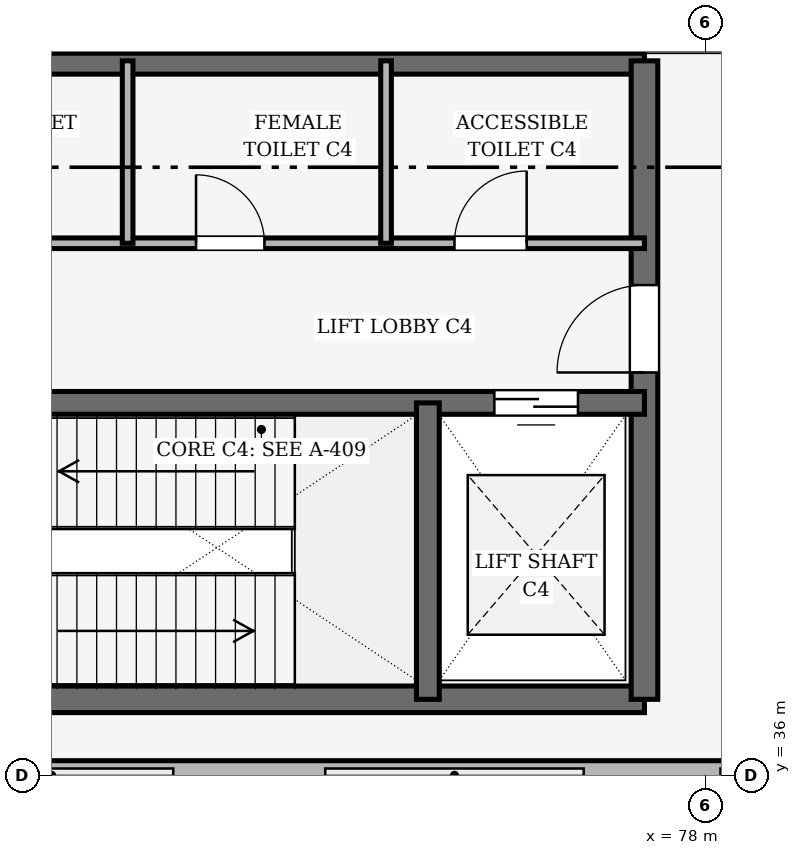
"""IFC4 building model, lengths in metres.
Left out: names, types, materials, properties, quantities, classifications, styles, units other than length and angle.
Written with IfcOpenShell. Run it as: python <this file> out.ifc"""

import sys

from ifc_helpers import new_model, si_unit, direction, frame, frame_2d, origin, place, context, subcontext, project, spatial, rectangle, extrude, element, fill, save


model = new_model("IFC4")
c1 = context("Model", 3, precision=1e-05, world=origin(), true_north=direction((0.0, 1.0)))
c2 = subcontext(c1, "Body", "Model", "MODEL_VIEW")
j1 = project(units=[si_unit("LENGTHUNIT", "METRE"), si_unit("PLANEANGLEUNIT", "RADIAN")], contexts=[c1])
p1 = place(None, origin())
s1 = spatial("IfcSite", under=j1, at=p1, CompositionType="ELEMENT")
p2 = place(p1, origin())
s2 = spatial("IfcBuilding", under=s1, at=p2, CompositionType="ELEMENT")
p3 = place(p2, frame((0.0, 0.0, 5.4)))
s3 = spatial("IfcBuildingStorey", under=s2, at=p3, CompositionType="ELEMENT", Elevation=5.4)
p4 = place(p3, frame((66.0, 36.0, 0.0), z_axis=(0.0, 0.0, 1.0), x_axis=(1.0, 0.0, 0.0)))
e1 = element("IfcWall", 1, at=p4, inside=s3, PredefinedType="SOLIDWALL", context=c2, shape_type="SweptSolid", body=[
    extrude(rectangle(XDim=18.0, YDim=0.385, at=frame_2d((9.0, 0.0))), origin(), (0.0, 0.0, 1.0), 0.6),
])
for number, where, z_axis, x_axis in (
    (2, (67.0, 37.0, 0.0), (0.0, 0.0, 1.0), (1.0, 0.0, 0.0)),
    (3, (77.2, 45.4, 0.0), (0.0, 0.0, 1.0), (-1.0, 0.0, 0.0)),
):
    element("IfcWall", number, at=place(p3, frame(where, z_axis=z_axis, x_axis=x_axis)), inside=s3, PredefinedType="SHEAR", context=c2, shape_type="SweptSolid", body=[
        extrude(rectangle(XDim=10.2, YDim=0.35, at=frame_2d((5.1, 0.0))), origin(), (0.0, 0.0, 1.0), 5.4),
    ])
p5 = place(p3, frame((77.2, 37.0, 0.0), z_axis=(0.0, 0.0, 1.0), x_axis=(0.0, 1.0, 0.0)))
e4 = element("IfcWall", 4, at=p5, inside=s3, PredefinedType="SHEAR", context=c2, shape_type="SweptSolid", body=[
    extrude(rectangle(XDim=8.4, YDim=0.35, at=frame_2d((4.2, 0.0))), origin(), (0.0, 0.0, 1.0), 5.4),
])
p6 = place(p5, frame((4.3, 0.0, 0.0)))
e5 = element("IfcOpeningElement", 5, at=p6, cuts=e4, PredefinedType="OPENING", context=c2, shape_type="SweptSolid", body=[
    extrude(rectangle(XDim=1.15, YDim=2.15, at=frame_2d((0.575, 1.075))), frame((0.0, 0.185, 0.0), z_axis=(0.0, -1.0, 0.0), x_axis=(1.0, 0.0, 0.0)), (0.0, 0.0, 1.0), 0.37),
])
p7 = place(p3, frame((67.0, 40.9, 0.0), z_axis=(0.0, 0.0, 1.0), x_axis=(1.0, 0.0, 0.0)))
e6 = element("IfcWall", 6, at=p7, inside=s3, PredefinedType="SHEAR", context=c2, shape_type="SweptSolid", body=[
    extrude(rectangle(XDim=10.2, YDim=0.3, at=frame_2d((5.1, 0.0))), origin(), (0.0, 0.0, 1.0), 5.4),
])
p8 = place(p7, frame((0.28, 0.0, 0.0)))
e7 = element("IfcOpeningElement", 7, at=p8, cuts=e6, PredefinedType="OPENING", context=c2, shape_type="SweptSolid", body=[
    extrude(rectangle(XDim=1.45, YDim=2.15, at=frame_2d((0.725, 1.075))), frame((0.0, 0.16, 0.0), z_axis=(0.0, -1.0, 0.0), x_axis=(1.0, 0.0, 0.0)), (0.0, 0.0, 1.0), 0.32),
])
p9 = place(p7, frame((8.225, 0.0, 0.0)))
e8 = element("IfcOpeningElement", 8, at=p9, cuts=e6, PredefinedType="OPENING", context=c2, shape_type="SweptSolid", body=[
    extrude(rectangle(XDim=1.1, YDim=2.15, at=frame_2d((0.55, 1.075))), frame((0.0, 0.16, 0.0), z_axis=(0.0, -1.0, 0.0), x_axis=(1.0, 0.0, 0.0)), (0.0, 0.0, 1.0), 0.32),
])
p10 = place(p3, frame((74.35, 37.0, 0.0), z_axis=(0.0, 0.0, 1.0), x_axis=(0.0, 1.0, 0.0)))
e9 = element("IfcWall", 9, at=p10, inside=s3, PredefinedType="SHEAR", context=c2, shape_type="SweptSolid", body=[
    extrude(rectangle(XDim=3.9, YDim=0.3, at=frame_2d((1.95, 0.0))), origin(), (0.0, 0.0, 1.0), 5.4),
])
p11 = place(p3, frame((67.0, 43.0, 0.0), z_axis=(0.0, 0.0, 1.0), x_axis=(1.0, 0.0, 0.0)))
e10 = element("IfcWall", 10, at=p11, inside=s3, PredefinedType="PARTITIONING", context=c2, shape_type="SweptSolid", body=[
    extrude(rectangle(XDim=10.2, YDim=0.14, at=frame_2d((5.1, 0.0))), origin(), (0.0, 0.0, 1.0), 4.5),
])
p12 = place(p11, frame((0.9, 0.0, 0.0)))
e11 = element("IfcOpeningElement", 11, at=p12, cuts=e10, PredefinedType="OPENING", context=c2, shape_type="SweptSolid", body=[
    extrude(rectangle(XDim=0.9, YDim=2.1, at=frame_2d((0.45, 1.05))), frame((0.0, 0.08, 0.0), z_axis=(0.0, -1.0, 0.0), x_axis=(1.0, 0.0, 0.0)), (0.0, 0.0, 1.0), 0.16),
])
p13 = place(p11, frame((4.3, 0.0, 0.0)))
e12 = element("IfcOpeningElement", 12, at=p13, cuts=e10, PredefinedType="OPENING", context=c2, shape_type="SweptSolid", body=[
    extrude(rectangle(XDim=0.9, YDim=2.1, at=frame_2d((0.45, 1.05))), frame((0.0, 0.08, 0.0), z_axis=(0.0, -1.0, 0.0), x_axis=(1.0, 0.0, 0.0)), (0.0, 0.0, 1.0), 0.16),
])
p14 = place(p11, frame((7.7, 0.0, 0.0)))
e13 = element("IfcOpeningElement", 13, at=p14, cuts=e10, PredefinedType="OPENING", context=c2, shape_type="SweptSolid", body=[
    extrude(rectangle(XDim=0.95, YDim=2.1, at=frame_2d((0.475, 1.05))), frame((0.0, 0.08, 0.0), z_axis=(0.0, -1.0, 0.0), x_axis=(1.0, 0.0, 0.0)), (0.0, 0.0, 1.0), 0.16),
])
for number, where, z_axis, x_axis in (
    (14, (70.4, 43.0, 0.0), (0.0, 0.0, 1.0), (0.0, 1.0, 0.0)),
    (15, (73.8, 43.0, 0.0), (0.0, 0.0, 1.0), (0.0, 1.0, 0.0)),
):
    element("IfcWall", number, at=place(p3, frame(where, z_axis=z_axis, x_axis=x_axis)), inside=s3, PredefinedType="PARTITIONING", context=c2, shape_type="SweptSolid", body=[
        extrude(rectangle(XDim=2.4, YDim=0.14, at=frame_2d((1.2, 0.0))), origin(), (0.0, 0.0, 1.0), 4.5),
    ])
p15 = place(p6, origin())
e16 = element("IfcDoor", 16, at=p15, inside=s3, OperationType="SINGLE_SWING_LEFT", PredefinedType="DOOR", context=c2, shape_type="SweptSolid", body=[
    extrude(rectangle(XDim=1.15, YDim=2.15, at=frame_2d((0.575, 1.075))), frame((0.0, 0.025, 0.0), z_axis=(0.0, -1.0, 0.0), x_axis=(1.0, 0.0, 0.0)), (0.0, 0.0, 1.0), 0.05),
])
fill(e5, e16)
p16 = place(p9, origin())
e17 = element("IfcDoor", 17, at=p16, inside=s3, OperationType="DOUBLE_DOOR_SLIDING", PredefinedType="DOOR", context=c2, shape_type="SweptSolid", body=[
    extrude(rectangle(XDim=1.1, YDim=2.15, at=frame_2d((0.55, 1.075))), frame((0.0, 0.025, 0.0), z_axis=(0.0, -1.0, 0.0), x_axis=(1.0, 0.0, 0.0)), (0.0, 0.0, 1.0), 0.05),
])
fill(e8, e17)
p17 = place(p13, origin())
e18 = element("IfcDoor", 18, at=p17, inside=s3, OperationType="SINGLE_SWING_LEFT", PredefinedType="DOOR", context=c2, shape_type="SweptSolid", body=[
    extrude(rectangle(XDim=0.9, YDim=2.1, at=frame_2d((0.45, 1.05))), frame((0.0, 0.025, 0.0), z_axis=(0.0, -1.0, 0.0), x_axis=(1.0, 0.0, 0.0)), (0.0, 0.0, 1.0), 0.05),
])
fill(e12, e18)
p18 = place(p14, origin())
e19 = element("IfcDoor", 19, at=p18, inside=s3, OperationType="SINGLE_SWING_RIGHT", PredefinedType="DOOR", context=c2, shape_type="SweptSolid", body=[
    extrude(rectangle(XDim=0.95, YDim=2.1, at=frame_2d((0.475, 1.05))), frame((0.0, 0.025, 0.0), z_axis=(0.0, -1.0, 0.0), x_axis=(1.0, 0.0, 0.0)), (0.0, 0.0, 1.0), 0.05),
])
fill(e13, e19)
save(model, sys.argv[1])
